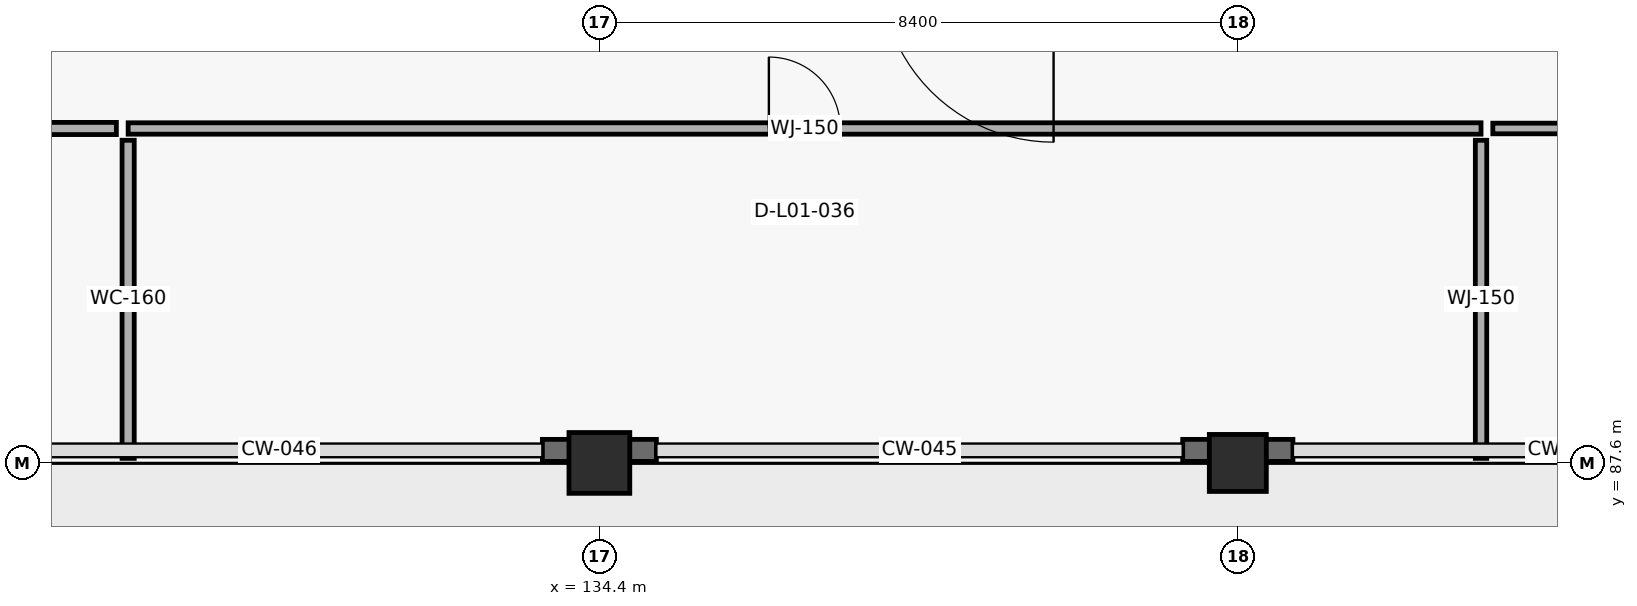
"""IFC4 building model, lengths in metres.
Left out: names, types, materials, properties, quantities, classifications, styles, units other than length and angle.
Written with IfcOpenShell. Run it as: python <this file> out.ifc"""

import sys

from ifc_helpers import new_model, si_unit, direction, frame, frame_2d, origin, origin_2d, place, context, subcontext, project, spatial, rectangle, extrude, element, fill, save


model = new_model("IFC4")
c1 = context("Model", 3, precision=1e-05, world=origin(), true_north=direction((0.0, 1.0)))
c2 = subcontext(c1, "Body", "Model", "MODEL_VIEW")
j1 = project(units=[si_unit("LENGTHUNIT", "METRE"), si_unit("PLANEANGLEUNIT", "RADIAN")], contexts=[c1])
p1 = place(None, origin())
s1 = spatial("IfcSite", under=j1, at=p1, CompositionType="ELEMENT")
p2 = place(p1, origin())
s2 = spatial("IfcBuilding", under=s1, at=p2, CompositionType="ELEMENT")
p3 = place(p2, origin())
s3 = spatial("IfcBuildingStorey", under=s2, at=p3, CompositionType="ELEMENT", Elevation=0.0)
p4 = place(p3, frame((134.4, 87.6, 0.0), z_axis=(0.0, 0.0, 1.0), x_axis=(1.0, 0.0, 0.0)))
e1 = element("IfcColumn", 1, at=p4, inside=s3, PredefinedType="COLUMN", context=c2, shape_type="SweptSolid", body=[
    extrude(rectangle(XDim=0.8, YDim=0.8, at=origin_2d()), origin(), (0.0, 0.0, 1.0), 5.4),
])
p5 = place(p3, frame((142.8, 87.6, 0.0), z_axis=(0.0, 0.0, 1.0), x_axis=(1.0, 0.0, 0.0)))
e2 = element("IfcColumn", 2, at=p5, inside=s3, PredefinedType="COLUMN", context=c2, shape_type="SweptSolid", body=[
    extrude(rectangle(XDim=0.75, YDim=0.75, at=origin_2d()), origin(), (0.0, 0.0, 1.0), 5.4),
])
p6 = place(p3, frame((143.525, 87.765, 0.0), z_axis=(0.0, 0.0, 1.0), x_axis=(-1.0, 0.0, 0.0)))
e3 = element("IfcWall", 3, at=p6, inside=s3, PredefinedType="SOLIDWALL", context=c2, shape_type="SweptSolid", body=[
    extrude(rectangle(XDim=1.45, YDim=0.29, at=frame_2d((0.725, 0.0))), origin(), (0.0, 0.0, 1.0), 5.12),
])
p7 = place(p3, frame((135.15, 87.765, 0.0), z_axis=(0.0, 0.0, 1.0), x_axis=(-1.0, 0.0, 0.0)))
e4 = element("IfcWall", 4, at=p7, inside=s3, PredefinedType="SOLIDWALL", context=c2, shape_type="SweptSolid", body=[
    extrude(rectangle(XDim=1.5, YDim=0.29, at=frame_2d((0.75, 0.0))), origin(), (0.0, 0.0, 1.0), 5.12),
])
p8 = place(p3, frame((128.2, 92.0, 0.0), z_axis=(0.0, 0.0, 1.0), x_axis=(1.0, 0.0, 0.0)))
e5 = element("IfcWall", 5, at=p8, inside=s3, PredefinedType="PARTITIONING", context=c2, shape_type="SweptSolid", body=[
    extrude(rectangle(XDim=17.8, YDim=0.15, at=frame_2d((8.9, 0.0))), origin(), (0.0, 0.0, 1.0), 5.12),
])
p9 = place(p8, frame((8.43, 0.0, 0.0)))
e6 = element("IfcOpeningElement", 6, at=p9, cuts=e5, PredefinedType="OPENING", context=c2, shape_type="SweptSolid", body=[
    extrude(rectangle(XDim=0.94, YDim=2.18, at=frame_2d((0.47, 1.09))), frame((0.0, 0.085, 0.0), z_axis=(0.0, -1.0, 0.0), x_axis=(1.0, 0.0, 0.0)), (0.0, 0.0, 1.0), 0.17),
])
p10 = place(p3, frame((146.155, 92.0, 0.0), z_axis=(0.0, 0.0, 1.0), x_axis=(1.0, 0.0, 0.0)))
e7 = element("IfcWall", 7, at=p10, inside=s3, PredefinedType="PARTITIONING", context=c2, shape_type="SweptSolid", body=[
    extrude(rectangle(XDim=13.245, YDim=0.14, at=frame_2d((6.623, 0.0))), origin(), (0.0, 0.0, 1.0), 5.12),
])
p11 = place(p10, frame((5.863, 0.0, 0.0)))
e8 = element("IfcOpeningElement", 8, at=p11, cuts=e7, PredefinedType="OPENING", context=c2, shape_type="SweptSolid", body=[
    extrude(rectangle(XDim=1.52, YDim=2.4, at=frame_2d((0.76, 1.2))), frame((0.0, 0.08, 0.0), z_axis=(0.0, -1.0, 0.0), x_axis=(1.0, 0.0, 0.0)), (0.0, 0.0, 1.0), 0.16),
])
p12 = place(p3, frame((122.5, 92.0, 0.0), z_axis=(0.0, 0.0, 1.0), x_axis=(1.0, 0.0, 0.0)))
e9 = element("IfcWall", 9, at=p12, inside=s3, PredefinedType="PARTITIONING", context=c2, shape_type="SweptSolid", body=[
    extrude(rectangle(XDim=5.545, YDim=0.16, at=frame_2d((2.772, 0.0))), origin(), (0.0, 0.0, 1.0), 5.12),
])
p13 = place(p3, frame((128.2, 91.845, 0.0), z_axis=(0.0, 0.0, 1.0), x_axis=(0.0, -1.0, 0.0)))
e10 = element("IfcWall", 10, at=p13, inside=s3, PredefinedType="PARTITIONING", context=c2, shape_type="SweptSolid", body=[
    extrude(rectangle(XDim=4.185, YDim=0.16, at=frame_2d((2.093, 0.0))), origin(), (0.0, 0.0, 1.0), 5.12),
])
p14 = place(p3, frame((146.0, 91.845, 0.0), z_axis=(0.0, 0.0, 1.0), x_axis=(0.0, -1.0, 0.0)))
e11 = element("IfcWall", 11, at=p14, inside=s3, PredefinedType="PARTITIONING", context=c2, shape_type="SweptSolid", body=[
    extrude(rectangle(XDim=4.185, YDim=0.15, at=frame_2d((2.093, 0.0))), origin(), (0.0, 0.0, 1.0), 5.12),
])
p15 = place(p9, origin())
e12 = element("IfcDoor", 12, at=p15, inside=s3, OperationType="SINGLE_SWING_LEFT", PredefinedType="DOOR", context=c2, shape_type="SweptSolid", body=[
    extrude(rectangle(XDim=0.94, YDim=2.18, at=frame_2d((0.47, 1.09))), frame((0.0, 0.025, 0.0), z_axis=(0.0, -1.0, 0.0), x_axis=(1.0, 0.0, 0.0)), (0.0, 0.0, 1.0), 0.05),
])
fill(e6, e12)
save(model, sys.argv[1])
